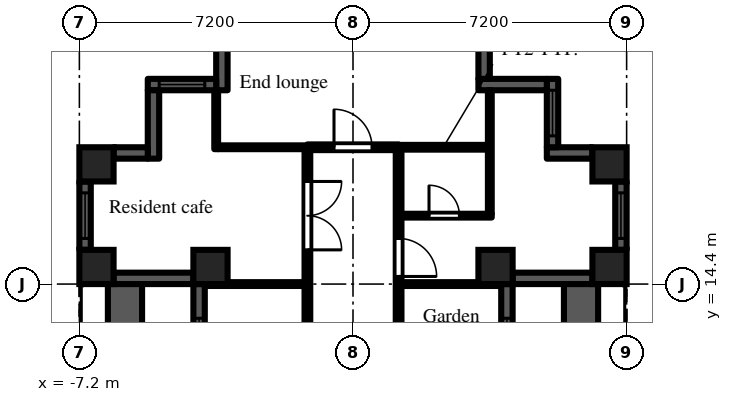
"""IFC4 building model, lengths in metres.
Left out: names, types, materials, properties, quantities, classifications, styles, units other than length and angle.
Written with IfcOpenShell. Run it as: python <this file> out.ifc"""

import sys

from ifc_helpers import new_model, si_unit, direction, frame, frame_2d, origin, origin_2d, place, context, subcontext, project, spatial, rectangle, extrude, element, fill, save


model = new_model("IFC4")
c1 = context("Model", 3, precision=1e-05, world=origin(), true_north=direction((0.0, 1.0)))
c2 = subcontext(c1, "Body", "Model", "MODEL_VIEW")
j1 = project(units=[si_unit("LENGTHUNIT", "METRE"), si_unit("PLANEANGLEUNIT", "RADIAN")], contexts=[c1])
p1 = place(None, origin())
s1 = spatial("IfcSite", under=j1, at=p1, CompositionType="ELEMENT")
p2 = place(p1, origin())
s2 = spatial("IfcBuilding", under=s1, at=p2, CompositionType="ELEMENT")
p3 = place(p2, frame((0.0, 0.0, 84.9)))
s3 = spatial("IfcBuildingStorey", under=s2, at=p3, CompositionType="ELEMENT", Elevation=84.9)
for number, where, z_axis, x_axis in (
    (1, (-6.75, 14.85, 0.0), (0.0, 0.0, 1.0), (1.0, 0.0, 0.0)),
    (2, (-6.75, 17.55, 0.0), (0.0, 0.0, 1.0), (1.0, 0.0, 0.0)),
    (3, (-3.75, 14.85, 0.0), (0.0, 0.0, 1.0), (1.0, 0.0, 0.0)),
    (4, (3.75, 14.85, 0.0), (0.0, 0.0, 1.0), (1.0, 0.0, 0.0)),
    (5, (6.75, 14.85, 0.0), (0.0, 0.0, 1.0), (1.0, 0.0, 0.0)),
    (6, (6.75, 17.55, 0.0), (0.0, 0.0, 1.0), (1.0, 0.0, 0.0)),
):
    element("IfcColumn", number, at=place(p3, frame(where, z_axis=z_axis, x_axis=x_axis)), inside=s3, PredefinedType="COLUMN", context=c2, shape_type="SweptSolid", body=[
        extrude(rectangle(XDim=0.9, YDim=0.9, at=origin_2d()), origin(), (0.0, 0.0, 1.0), 3.0),
    ])
p4 = place(p3, frame((4.05, 7.2, 0.0), z_axis=(0.0, 0.0, 1.0), x_axis=(0.0, 1.0, 0.0)))
e7 = element("IfcWall", 7, at=p4, inside=s3, PredefinedType="SOLIDWALL", context=c2, shape_type="SweptSolid", body=[
    extrude(rectangle(XDim=7.2, YDim=0.3, at=frame_2d((3.6, 0.0))), origin(), (0.0, 0.0, 1.0), 2.1),
])
p5 = place(p4, frame((3.0, 0.0, 0.0)))
e8 = element("IfcOpeningElement", 8, at=p5, cuts=e7, PredefinedType="OPENING", context=c2, shape_type="SweptSolid", body=[
    extrude(rectangle(XDim=1.2, YDim=2.05, at=frame_2d((0.6, 1.025))), frame((0.0, 0.16, 0.0), z_axis=(0.0, -1.0, 0.0), x_axis=(1.0, 0.0, 0.0)), (0.0, 0.0, 1.0), 0.32),
])
p6 = place(p4, frame((0.9, 0.0, 0.2)))
e9 = element("IfcOpeningElement", 9, at=p6, cuts=e7, PredefinedType="OPENING", context=c2, shape_type="SweptSolid", body=[
    extrude(rectangle(XDim=1.8, YDim=1.85, at=frame_2d((0.9, 0.925))), frame((0.0, 0.16, 0.0), z_axis=(0.0, -1.0, 0.0), x_axis=(1.0, 0.0, 0.0)), (0.0, 0.0, 1.0), 0.32),
])
p7 = place(p4, frame((4.5, 0.0, 0.2)))
e10 = element("IfcOpeningElement", 10, at=p7, cuts=e7, PredefinedType="OPENING", context=c2, shape_type="SweptSolid", body=[
    extrude(rectangle(XDim=1.8, YDim=1.85, at=frame_2d((0.9, 0.925))), frame((0.0, 0.16, 0.0), z_axis=(0.0, -1.0, 0.0), x_axis=(1.0, 0.0, 0.0)), (0.0, 0.0, 1.0), 0.32),
])
p8 = place(p3, frame((4.2, 14.55, 0.0), z_axis=(0.0, 0.0, 1.0), x_axis=(1.0, 0.0, 0.0)))
e11 = element("IfcWall", 11, at=p8, inside=s3, PredefinedType="SOLIDWALL", context=c2, shape_type="SweptSolid", body=[
    extrude(rectangle(XDim=2.1, YDim=0.3, at=frame_2d((1.05, 0.0))), origin(), (0.0, 0.0, 1.0), 2.1),
])
p9 = place(p3, frame((7.05, 15.3, 0.0), z_axis=(0.0, 0.0, 1.0), x_axis=(0.0, 1.0, 0.0)))
e12 = element("IfcWall", 12, at=p9, inside=s3, PredefinedType="SOLIDWALL", context=c2, shape_type="SweptSolid", body=[
    extrude(rectangle(XDim=1.8, YDim=0.3, at=frame_2d((0.9, 0.0))), origin(), (0.0, 0.0, 1.0), 2.1),
])
p10 = place(p9, frame((0.3, 0.0, 0.2)))
e13 = element("IfcOpeningElement", 13, at=p10, cuts=e12, PredefinedType="OPENING", context=c2, shape_type="SweptSolid", body=[
    extrude(rectangle(XDim=1.2, YDim=1.85, at=frame_2d((0.6, 0.925))), frame((0.0, 0.16, 0.0), z_axis=(0.0, -1.0, 0.0), x_axis=(1.0, 0.0, 0.0)), (0.0, 0.0, 1.0), 0.32),
])
p11 = place(p3, frame((6.3, 17.85, 0.0), z_axis=(0.0, 0.0, 1.0), x_axis=(-1.0, 0.0, 0.0)))
e14 = element("IfcWall", 14, at=p11, inside=s3, PredefinedType="SOLIDWALL", context=c2, shape_type="SweptSolid", body=[
    extrude(rectangle(XDim=1.2, YDim=0.3, at=frame_2d((0.6, 0.0))), origin(), (0.0, 0.0, 1.0), 2.575),
])
p12 = place(p3, frame((5.25, 18.0, 0.0), z_axis=(0.0, 0.0, 1.0), x_axis=(0.0, 1.0, 0.0)))
e15 = element("IfcWall", 15, at=p12, inside=s3, PredefinedType="SOLIDWALL", context=c2, shape_type="SweptSolid", body=[
    extrude(rectangle(XDim=1.8, YDim=0.3, at=frame_2d((0.9, 0.0))), origin(), (0.0, 0.0, 1.0), 2.575),
])
p13 = place(p12, frame((0.3, 0.0, 0.2)))
e16 = element("IfcOpeningElement", 16, at=p13, cuts=e15, PredefinedType="OPENING", context=c2, shape_type="SweptSolid", body=[
    extrude(rectangle(XDim=1.2, YDim=1.85, at=frame_2d((0.6, 0.925))), frame((0.0, 0.16, 0.0), z_axis=(0.0, -1.0, 0.0), x_axis=(1.0, 0.0, 0.0)), (0.0, 0.0, 1.0), 0.32),
])
p14 = place(p3, frame((5.1, 19.65, 0.0), z_axis=(0.0, 0.0, 1.0), x_axis=(-1.0, 0.0, 0.0)))
e17 = element("IfcWall", 17, at=p14, inside=s3, PredefinedType="SOLIDWALL", context=c2, shape_type="SweptSolid", body=[
    extrude(rectangle(XDim=1.8, YDim=0.3, at=frame_2d((0.9, 0.0))), origin(), (0.0, 0.0, 1.0), 2.575),
])
p15 = place(p3, frame((3.45, 19.8, 0.0), z_axis=(0.0, 0.0, 1.0), x_axis=(0.0, 1.0, 0.0)))
e18 = element("IfcWall", 18, at=p15, inside=s3, PredefinedType="SOLIDWALL", context=c2, shape_type="SweptSolid", body=[
    extrude(rectangle(XDim=0.9, YDim=0.3, at=frame_2d((0.45, 0.0))), origin(), (0.0, 0.0, 1.0), 2.575),
])
p16 = place(p3, frame((-3.45, 20.7, 0.0), z_axis=(0.0, 0.0, 1.0), x_axis=(0.0, -1.0, 0.0)))
e19 = element("IfcWall", 19, at=p16, inside=s3, PredefinedType="SOLIDWALL", context=c2, shape_type="SweptSolid", body=[
    extrude(rectangle(XDim=1.2, YDim=0.3, at=frame_2d((0.6, 0.0))), origin(), (0.0, 0.0, 1.0), 2.575),
])
p17 = place(p3, frame((-3.6, 19.65, 0.0), z_axis=(0.0, 0.0, 1.0), x_axis=(-1.0, 0.0, 0.0)))
e20 = element("IfcWall", 20, at=p17, inside=s3, PredefinedType="SOLIDWALL", context=c2, shape_type="SweptSolid", body=[
    extrude(rectangle(XDim=1.8, YDim=0.3, at=frame_2d((0.9, 0.0))), origin(), (0.0, 0.0, 1.0), 2.575),
])
p18 = place(p17, frame((0.3, 0.0, 0.2)))
e21 = element("IfcOpeningElement", 21, at=p18, cuts=e20, PredefinedType="OPENING", context=c2, shape_type="SweptSolid", body=[
    extrude(rectangle(XDim=1.2, YDim=1.85, at=frame_2d((0.6, 0.925))), frame((0.0, 0.16, 0.0), z_axis=(0.0, -1.0, 0.0), x_axis=(1.0, 0.0, 0.0)), (0.0, 0.0, 1.0), 0.32),
])
p19 = place(p3, frame((-5.25, 19.5, 0.0), z_axis=(0.0, 0.0, 1.0), x_axis=(0.0, -1.0, 0.0)))
e22 = element("IfcWall", 22, at=p19, inside=s3, PredefinedType="SOLIDWALL", context=c2, shape_type="SweptSolid", body=[
    extrude(rectangle(XDim=1.8, YDim=0.3, at=frame_2d((0.9, 0.0))), origin(), (0.0, 0.0, 1.0), 2.575),
])
p20 = place(p3, frame((-5.4, 17.85, 0.0), z_axis=(0.0, 0.0, 1.0), x_axis=(-1.0, 0.0, 0.0)))
e23 = element("IfcWall", 23, at=p20, inside=s3, PredefinedType="SOLIDWALL", context=c2, shape_type="SweptSolid", body=[
    extrude(rectangle(XDim=0.9, YDim=0.3, at=frame_2d((0.45, 0.0))), origin(), (0.0, 0.0, 1.0), 2.575),
])
p21 = place(p3, frame((-7.05, 17.1, 0.0), z_axis=(0.0, 0.0, 1.0), x_axis=(0.0, -1.0, 0.0)))
e24 = element("IfcWall", 24, at=p21, inside=s3, PredefinedType="SOLIDWALL", context=c2, shape_type="SweptSolid", body=[
    extrude(rectangle(XDim=1.8, YDim=0.3, at=frame_2d((0.9, 0.0))), origin(), (0.0, 0.0, 1.0), 2.1),
])
p22 = place(p21, frame((0.3, 0.0, 0.2)))
e25 = element("IfcOpeningElement", 25, at=p22, cuts=e24, PredefinedType="OPENING", context=c2, shape_type="SweptSolid", body=[
    extrude(rectangle(XDim=1.2, YDim=1.85, at=frame_2d((0.6, 0.925))), frame((0.0, 0.16, 0.0), z_axis=(0.0, -1.0, 0.0), x_axis=(1.0, 0.0, 0.0)), (0.0, 0.0, 1.0), 0.32),
])
p23 = place(p3, frame((-6.3, 14.55, 0.0), z_axis=(0.0, 0.0, 1.0), x_axis=(1.0, 0.0, 0.0)))
e26 = element("IfcWall", 26, at=p23, inside=s3, PredefinedType="SOLIDWALL", context=c2, shape_type="SweptSolid", body=[
    extrude(rectangle(XDim=2.1, YDim=0.3, at=frame_2d((1.05, 0.0))), origin(), (0.0, 0.0, 1.0), 2.1),
])
p24 = place(p3, frame((-4.05, 14.4, 0.0), z_axis=(0.0, 0.0, 1.0), x_axis=(0.0, -1.0, 0.0)))
e27 = element("IfcWall", 27, at=p24, inside=s3, PredefinedType="SOLIDWALL", context=c2, shape_type="SweptSolid", body=[
    extrude(rectangle(XDim=7.2, YDim=0.3, at=frame_2d((3.6, 0.0))), origin(), (0.0, 0.0, 1.0), 2.1),
])
p25 = place(p24, frame((3.0, 0.0, 0.0)))
e28 = element("IfcOpeningElement", 28, at=p25, cuts=e27, PredefinedType="OPENING", context=c2, shape_type="SweptSolid", body=[
    extrude(rectangle(XDim=1.2, YDim=2.05, at=frame_2d((0.6, 1.025))), frame((0.0, 0.16, 0.0), z_axis=(0.0, -1.0, 0.0), x_axis=(1.0, 0.0, 0.0)), (0.0, 0.0, 1.0), 0.32),
])
p26 = place(p24, frame((0.9, 0.0, 0.2)))
e29 = element("IfcOpeningElement", 29, at=p26, cuts=e27, PredefinedType="OPENING", context=c2, shape_type="SweptSolid", body=[
    extrude(rectangle(XDim=1.8, YDim=1.85, at=frame_2d((0.9, 0.925))), frame((0.0, 0.16, 0.0), z_axis=(0.0, -1.0, 0.0), x_axis=(1.0, 0.0, 0.0)), (0.0, 0.0, 1.0), 0.32),
])
p27 = place(p24, frame((4.5, 0.0, 0.2)))
e30 = element("IfcOpeningElement", 30, at=p27, cuts=e27, PredefinedType="OPENING", context=c2, shape_type="SweptSolid", body=[
    extrude(rectangle(XDim=1.8, YDim=1.85, at=frame_2d((0.9, 0.925))), frame((0.0, 0.16, 0.0), z_axis=(0.0, -1.0, 0.0), x_axis=(1.0, 0.0, 0.0)), (0.0, 0.0, 1.0), 0.32),
])
for number, where, z_axis, x_axis in (
    (31, (6.0, 7.2, 0.0), (0.0, 0.0, 1.0), (0.0, 1.0, 0.0)),
    (32, (-6.0, 7.2, 0.0), (0.0, 0.0, 1.0), (0.0, 1.0, 0.0)),
):
    element("IfcWall", number, at=place(p3, frame(where, z_axis=z_axis, x_axis=x_axis)), inside=s3, PredefinedType="PARAPET", context=c2, shape_type="SweptSolid", body=[
        extrude(rectangle(XDim=7.2, YDim=0.9, at=frame_2d((3.6, 0.0))), origin(), (0.0, 0.0, 1.0), 0.8),
    ])
p28 = place(p3, frame((-3.9, 14.4, 0.0), z_axis=(0.0, 0.0, 1.0), x_axis=(1.0, 0.0, 0.0)))
e33 = element("IfcWall", 33, at=p28, inside=s3, PredefinedType="PARTITIONING", context=c2, shape_type="SweptSolid", body=[
    extrude(rectangle(XDim=2.625, YDim=0.1, at=frame_2d((1.312, 0.0))), origin(), (0.0, 0.0, 1.0), 2.575),
])
p29 = place(p3, frame((-3.6, 17.95, 0.0), z_axis=(0.0, 0.0, 1.0), x_axis=(0.0, 1.0, 0.0)))
e34 = element("IfcWall", 34, at=p29, inside=s3, PredefinedType="PARTITIONING", context=c2, shape_type="SweptSolid", body=[
    extrude(rectangle(XDim=1.55, YDim=0.1, at=frame_2d((0.775, 0.0))), origin(), (0.0, 0.0, 1.0), 2.575),
])
p30 = place(p3, frame((-3.55, 18.0, 0.0), z_axis=(0.0, 0.0, 1.0), x_axis=(1.0, 0.0, 0.0)))
e35 = element("IfcWall", 35, at=p30, inside=s3, PredefinedType="PARTITIONING", context=c2, shape_type="SweptSolid", body=[
    extrude(rectangle(XDim=2.35, YDim=0.1, at=frame_2d((1.175, 0.0))), origin(), (0.0, 0.0, 1.0), 2.575),
])
p31 = place(p3, frame((-1.2, 1.275, 0.0), z_axis=(0.0, 0.0, 1.0), x_axis=(0.0, 1.0, 0.0)))
e36 = element("IfcWall", 36, at=p31, inside=s3, PredefinedType="PARTITIONING", context=c2, shape_type="SweptSolid", body=[
    extrude(rectangle(XDim=16.65, YDim=0.15, at=frame_2d((8.325, 0.0))), origin(), (0.0, 0.0, 1.0), 2.575),
])
p32 = place(p31, frame((2.475, 0.0, 0.0)))
e37 = element("IfcOpeningElement", 37, at=p32, cuts=e36, PredefinedType="OPENING", context=c2, shape_type="SweptSolid", body=[
    extrude(rectangle(XDim=0.9, YDim=2.1, at=frame_2d((0.45, 1.05))), frame((0.0, 0.085, 0.0), z_axis=(0.0, -1.0, 0.0), x_axis=(1.0, 0.0, 0.0)), (0.0, 0.0, 1.0), 0.17),
])
p33 = place(p31, frame((10.875, 0.0, 0.0)))
e38 = element("IfcOpeningElement", 38, at=p33, cuts=e36, PredefinedType="OPENING", context=c2, shape_type="SweptSolid", body=[
    extrude(rectangle(XDim=0.9, YDim=2.1, at=frame_2d((0.45, 1.05))), frame((0.0, 0.085, 0.0), z_axis=(0.0, -1.0, 0.0), x_axis=(1.0, 0.0, 0.0)), (0.0, 0.0, 1.0), 0.17),
])
p34 = place(p31, frame((14.025, 0.0, 0.0)))
e39 = element("IfcOpeningElement", 39, at=p34, cuts=e36, PredefinedType="OPENING", context=c2, shape_type="SweptSolid", body=[
    extrude(rectangle(XDim=1.8, YDim=2.1, at=frame_2d((0.9, 1.05))), frame((0.0, 0.085, 0.0), z_axis=(0.0, -1.0, 0.0), x_axis=(1.0, 0.0, 0.0)), (0.0, 0.0, 1.0), 0.17),
])
p35 = place(p3, frame((-1.2, 18.0, 0.0), z_axis=(0.0, 0.0, 1.0), x_axis=(1.0, 0.0, 0.0)))
e40 = element("IfcWall", 40, at=p35, inside=s3, PredefinedType="PARTITIONING", context=c2, shape_type="SweptSolid", body=[
    extrude(rectangle(XDim=2.4, YDim=0.15, at=frame_2d((1.2, 0.0))), origin(), (0.0, 0.0, 1.0), 2.575),
])
p36 = place(p35, frame((0.7, 0.0, 0.0)))
e41 = element("IfcOpeningElement", 41, at=p36, cuts=e40, PredefinedType="OPENING", context=c2, shape_type="SweptSolid", body=[
    extrude(rectangle(XDim=1.0, YDim=2.1, at=frame_2d((0.5, 1.05))), frame((0.0, 0.085, 0.0), z_axis=(0.0, -1.0, 0.0), x_axis=(1.0, 0.0, 0.0)), (0.0, 0.0, 1.0), 0.17),
])
p37 = place(p3, frame((1.2, 1.125, 0.0), z_axis=(0.0, 0.0, 1.0), x_axis=(0.0, 1.0, 0.0)))
e42 = element("IfcWall", 42, at=p37, inside=s3, PredefinedType="PARTITIONING", context=c2, shape_type="SweptSolid", body=[
    extrude(rectangle(XDim=16.8, YDim=0.15, at=frame_2d((8.4, 0.0))), origin(), (0.0, 0.0, 1.0), 2.575),
])
p38 = place(p37, frame((3.825, 0.0, 0.0)))
e43 = element("IfcOpeningElement", 43, at=p38, cuts=e42, PredefinedType="OPENING", context=c2, shape_type="SweptSolid", body=[
    extrude(rectangle(XDim=0.9, YDim=2.1, at=frame_2d((0.45, 1.05))), frame((0.0, 0.085, 0.0), z_axis=(0.0, -1.0, 0.0), x_axis=(1.0, 0.0, 0.0)), (0.0, 0.0, 1.0), 0.17),
])
p39 = place(p37, frame((7.425, 0.0, 0.0)))
e44 = element("IfcOpeningElement", 44, at=p39, cuts=e42, PredefinedType="OPENING", context=c2, shape_type="SweptSolid", body=[
    extrude(rectangle(XDim=0.9, YDim=2.1, at=frame_2d((0.45, 1.05))), frame((0.0, 0.085, 0.0), z_axis=(0.0, -1.0, 0.0), x_axis=(1.0, 0.0, 0.0)), (0.0, 0.0, 1.0), 0.17),
])
p40 = place(p37, frame((13.475, 0.0, 0.0)))
e45 = element("IfcOpeningElement", 45, at=p40, cuts=e42, PredefinedType="OPENING", context=c2, shape_type="SweptSolid", body=[
    extrude(rectangle(XDim=1.0, YDim=2.1, at=frame_2d((0.5, 1.05))), frame((0.0, 0.085, 0.0), z_axis=(0.0, -1.0, 0.0), x_axis=(1.0, 0.0, 0.0)), (0.0, 0.0, 1.0), 0.17),
])
p41 = place(p3, frame((1.275, 14.4, 0.0), z_axis=(0.0, 0.0, 1.0), x_axis=(1.0, 0.0, 0.0)))
e46 = element("IfcWall", 46, at=p41, inside=s3, PredefinedType="PARTITIONING", context=c2, shape_type="SweptSolid", body=[
    extrude(rectangle(XDim=2.625, YDim=0.1, at=frame_2d((1.312, 0.0))), origin(), (0.0, 0.0, 1.0), 2.575),
])
p42 = place(p3, frame((1.275, 16.2, 0.0), z_axis=(0.0, 0.0, 1.0), x_axis=(1.0, 0.0, 0.0)))
e47 = element("IfcWall", 47, at=p42, inside=s3, PredefinedType="PARTITIONING", context=c2, shape_type="SweptSolid", body=[
    extrude(rectangle(XDim=2.375, YDim=0.1, at=frame_2d((1.188, 0.0))), origin(), (0.0, 0.0, 1.0), 2.575),
])
p43 = place(p42, frame((0.725, 0.0, 0.0)))
e48 = element("IfcOpeningElement", 48, at=p43, cuts=e47, PredefinedType="OPENING", context=c2, shape_type="SweptSolid", body=[
    extrude(rectangle(XDim=0.8, YDim=2.1, at=frame_2d((0.4, 1.05))), frame((0.0, 0.06, 0.0), z_axis=(0.0, -1.0, 0.0), x_axis=(1.0, 0.0, 0.0)), (0.0, 0.0, 1.0), 0.12),
])
p44 = place(p3, frame((1.2, 18.0, 0.0), z_axis=(0.0, 0.0, 1.0), x_axis=(1.0, 0.0, 0.0)))
e49 = element("IfcWall", 49, at=p44, inside=s3, PredefinedType="PARTITIONING", context=c2, shape_type="SweptSolid", body=[
    extrude(rectangle(XDim=2.35, YDim=0.125, at=frame_2d((1.175, 0.0))), origin(), (0.0, 0.0, 1.0), 2.575),
])
p45 = place(p3, frame((3.6, 16.25, 0.0), z_axis=(0.0, 0.0, 1.0), x_axis=(0.0, 1.0, 0.0)))
e50 = element("IfcWall", 50, at=p45, inside=s3, PredefinedType="PARTITIONING", context=c2, shape_type="SweptSolid", body=[
    extrude(rectangle(XDim=3.25, YDim=0.1, at=frame_2d((1.625, 0.0))), origin(), (0.0, 0.0, 1.0), 2.575),
])
p46 = place(p7, origin())
e51 = element("IfcWindow", 51, at=p46, inside=s3, PartitioningType="SINGLE_PANEL", PredefinedType="WINDOW", context=c2, shape_type="SweptSolid", body=[
    extrude(rectangle(XDim=1.8, YDim=1.85, at=frame_2d((0.9, 0.925))), frame((0.0, 0.03, 0.0), z_axis=(0.0, -1.0, 0.0), x_axis=(1.0, 0.0, 0.0)), (0.0, 0.0, 1.0), 0.06),
])
fill(e10, e51)
p47 = place(p10, origin())
e52 = element("IfcWindow", 52, at=p47, inside=s3, PartitioningType="SINGLE_PANEL", PredefinedType="WINDOW", context=c2, shape_type="SweptSolid", body=[
    extrude(rectangle(XDim=1.2, YDim=1.85, at=frame_2d((0.6, 0.925))), frame((0.0, 0.03, 0.0), z_axis=(0.0, -1.0, 0.0), x_axis=(1.0, 0.0, 0.0)), (0.0, 0.0, 1.0), 0.06),
])
fill(e13, e52)
p48 = place(p13, origin())
e53 = element("IfcWindow", 53, at=p48, inside=s3, PartitioningType="SINGLE_PANEL", PredefinedType="WINDOW", context=c2, shape_type="SweptSolid", body=[
    extrude(rectangle(XDim=1.2, YDim=1.85, at=frame_2d((0.6, 0.925))), frame((0.0, 0.03, 0.0), z_axis=(0.0, -1.0, 0.0), x_axis=(1.0, 0.0, 0.0)), (0.0, 0.0, 1.0), 0.06),
])
fill(e16, e53)
p49 = place(p18, origin())
e54 = element("IfcWindow", 54, at=p49, inside=s3, PartitioningType="SINGLE_PANEL", PredefinedType="WINDOW", context=c2, shape_type="SweptSolid", body=[
    extrude(rectangle(XDim=1.2, YDim=1.85, at=frame_2d((0.6, 0.925))), frame((0.0, 0.03, 0.0), z_axis=(0.0, -1.0, 0.0), x_axis=(1.0, 0.0, 0.0)), (0.0, 0.0, 1.0), 0.06),
])
fill(e21, e54)
p50 = place(p22, origin())
e55 = element("IfcWindow", 55, at=p50, inside=s3, PartitioningType="SINGLE_PANEL", PredefinedType="WINDOW", context=c2, shape_type="SweptSolid", body=[
    extrude(rectangle(XDim=1.2, YDim=1.85, at=frame_2d((0.6, 0.925))), frame((0.0, 0.03, 0.0), z_axis=(0.0, -1.0, 0.0), x_axis=(1.0, 0.0, 0.0)), (0.0, 0.0, 1.0), 0.06),
])
fill(e25, e55)
p51 = place(p26, origin())
e56 = element("IfcWindow", 56, at=p51, inside=s3, PartitioningType="SINGLE_PANEL", PredefinedType="WINDOW", context=c2, shape_type="SweptSolid", body=[
    extrude(rectangle(XDim=1.8, YDim=1.85, at=frame_2d((0.9, 0.925))), frame((0.0, 0.03, 0.0), z_axis=(0.0, -1.0, 0.0), x_axis=(1.0, 0.0, 0.0)), (0.0, 0.0, 1.0), 0.06),
])
fill(e29, e56)
p52 = place(p36, origin())
e57 = element("IfcDoor", 57, at=p52, inside=s3, OperationType="SINGLE_SWING_LEFT", PredefinedType="DOOR", context=c2, shape_type="SweptSolid", body=[
    extrude(rectangle(XDim=1.0, YDim=2.1, at=frame_2d((0.5, 1.05))), frame((0.0, 0.025, 0.0), z_axis=(0.0, -1.0, 0.0), x_axis=(1.0, 0.0, 0.0)), (0.0, 0.0, 1.0), 0.05),
])
fill(e41, e57)
p53 = place(p34, frame((1.8, 0.0, 0.0), z_axis=(0.0, 0.0, 1.0), x_axis=(-1.0, 0.0, 0.0)))
e58 = element("IfcDoor", 58, at=p53, inside=s3, OperationType="DOUBLE_DOOR_DOUBLE_SWING", PredefinedType="DOOR", context=c2, shape_type="SweptSolid", body=[
    extrude(rectangle(XDim=1.8, YDim=2.1, at=frame_2d((0.9, 1.05))), frame((0.0, 0.025, 0.0), z_axis=(0.0, -1.0, 0.0), x_axis=(1.0, 0.0, 0.0)), (0.0, 0.0, 1.0), 0.05),
])
fill(e39, e58)
p54 = place(p43, origin())
e59 = element("IfcDoor", 59, at=p54, inside=s3, OperationType="SINGLE_SWING_LEFT", PredefinedType="DOOR", context=c2, shape_type="SweptSolid", body=[
    extrude(rectangle(XDim=0.8, YDim=2.1, at=frame_2d((0.4, 1.05))), frame((0.0, 0.025, 0.0), z_axis=(0.0, -1.0, 0.0), x_axis=(1.0, 0.0, 0.0)), (0.0, 0.0, 1.0), 0.05),
])
fill(e48, e59)
p55 = place(p40, frame((1.0, 0.0, 0.0), z_axis=(0.0, 0.0, 1.0), x_axis=(-1.0, 0.0, 0.0)))
e60 = element("IfcDoor", 60, at=p55, inside=s3, OperationType="SINGLE_SWING_RIGHT", PredefinedType="DOOR", context=c2, shape_type="SweptSolid", body=[
    extrude(rectangle(XDim=1.0, YDim=2.1, at=frame_2d((0.5, 1.05))), frame((0.0, 0.025, 0.0), z_axis=(0.0, -1.0, 0.0), x_axis=(1.0, 0.0, 0.0)), (0.0, 0.0, 1.0), 0.05),
])
fill(e45, e60)
save(model, sys.argv[1])
